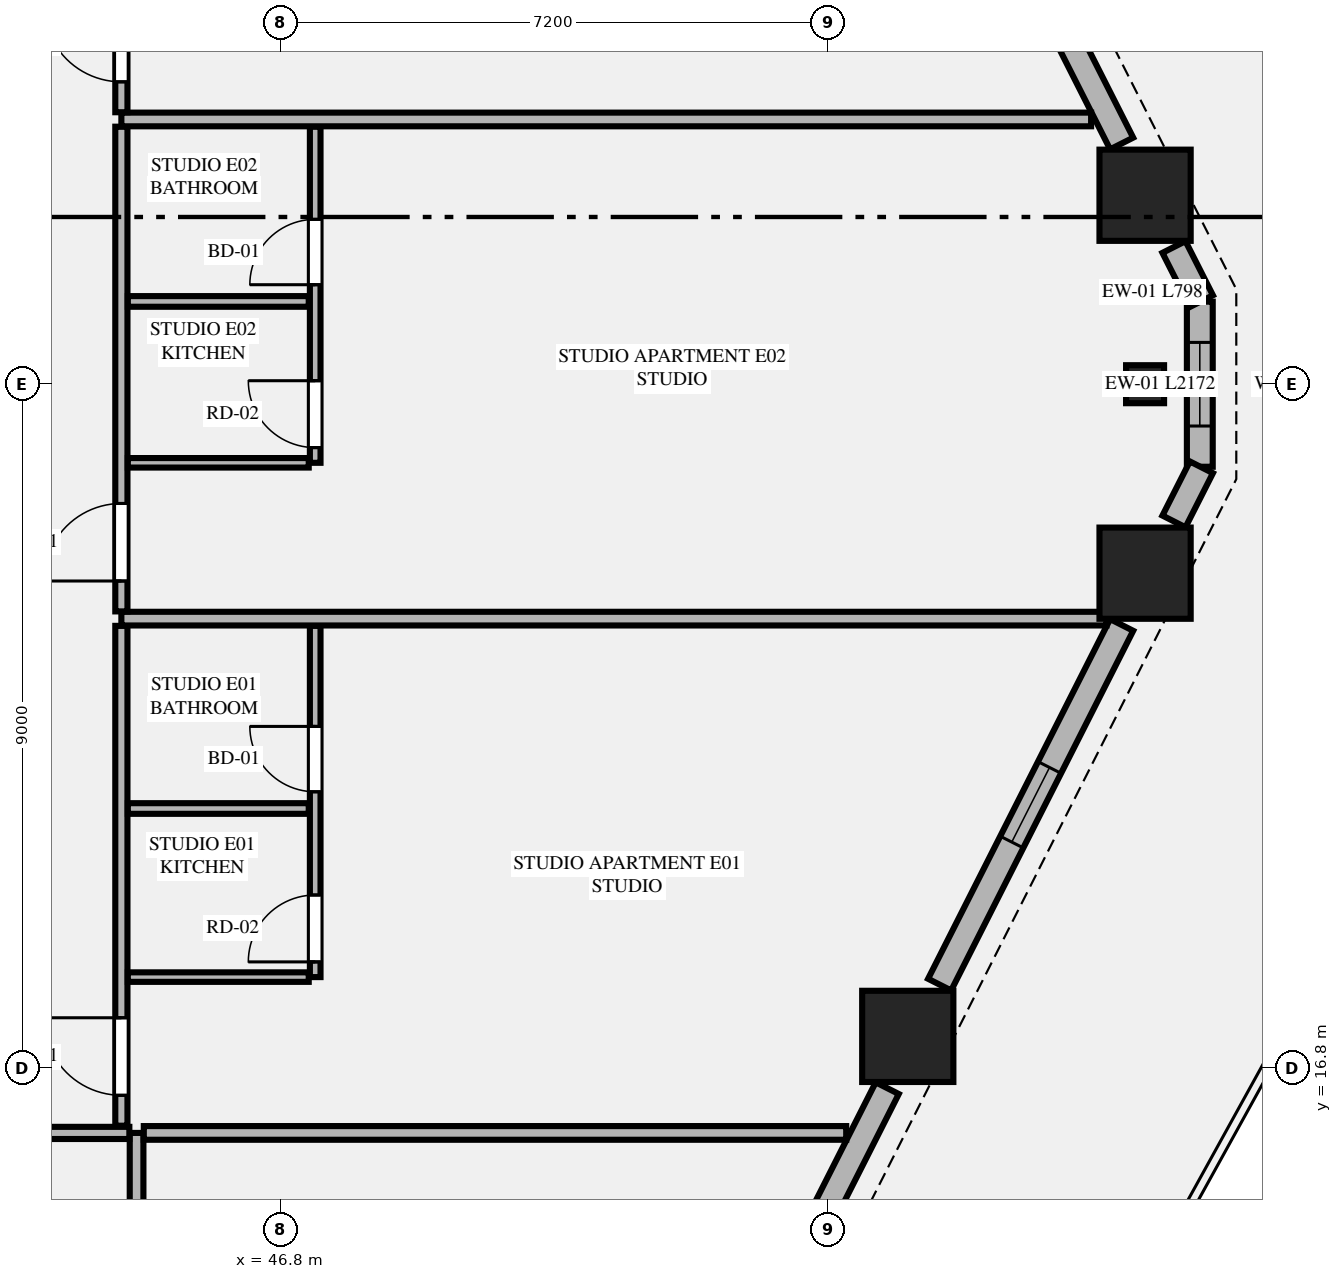
"""IFC4 building model, lengths in metres.
Left out: names, types, materials, properties, quantities, classifications, styles, units other than length and angle.
Written with IfcOpenShell. Run it as: python <this file> out.ifc"""

import sys

from ifc_helpers import new_model, si_unit, direction, frame, frame_2d, origin, origin_2d, place, context, subcontext, project, spatial, rectangle, extrude, element, fill, save


model = new_model("IFC4")
c1 = context("Model", 3, precision=1e-05, world=origin(), true_north=direction((0.0, 1.0)))
c2 = subcontext(c1, "Body", "Model", "MODEL_VIEW")
j1 = project(units=[si_unit("LENGTHUNIT", "METRE"), si_unit("PLANEANGLEUNIT", "RADIAN")], contexts=[c1])
p1 = place(None, origin())
s1 = spatial("IfcSite", under=j1, at=p1, CompositionType="ELEMENT")
p2 = place(p1, origin())
s2 = spatial("IfcBuilding", under=s1, at=p2, CompositionType="ELEMENT")
p3 = place(p2, frame((0.0, 0.0, 24.9)))
s3 = spatial("IfcBuildingStorey", under=s2, at=p3, CompositionType="ELEMENT", Elevation=24.9)
for number, where, z_axis, x_axis in (
    (1, (55.046, 17.22, 0.0), (0.0, 0.0, 1.0), (1.0, 0.0, 0.0)),
    (2, (58.168, 23.314, 0.0), (0.0, 0.0, 1.0), (1.0, 0.0, 0.0)),
    (3, (58.168, 28.286, 0.0), (0.0, 0.0, 1.0), (1.0, 0.0, 0.0)),
):
    element("IfcColumn", number, at=place(p3, frame(where, z_axis=z_axis, x_axis=x_axis)), inside=s3, PredefinedType="COLUMN", context=c2, shape_type="SweptSolid", body=[
        extrude(rectangle(XDim=1.2, YDim=1.2, at=origin_2d()), origin(), (0.0, 0.0, 1.0), 3.55),
    ])
p4 = place(p3, frame((58.168, 25.8, 0.0), z_axis=(0.0, 0.0, 1.0), x_axis=(0.0, 1.0, 0.0)))
e4 = element("IfcColumn", 4, at=p4, inside=s3, PredefinedType="PILASTER", context=c2, shape_type="SweptSolid", body=[
    extrude(rectangle(XDim=0.5, YDim=0.35, at=origin_2d()), origin(), (0.0, 0.0, 1.0), 3.55),
])
p5 = place(p3, frame((58.888, 24.714, 0.0), z_axis=(0.0, 0.0, 1.0), x_axis=(0.0, 1.0, 0.0)))
e5 = element("IfcWall", 5, at=p5, inside=s3, PredefinedType="STANDARD", context=c2, shape_type="SweptSolid", body=[
    extrude(rectangle(XDim=2.172, YDim=0.34, at=frame_2d((1.086, 0.0))), origin(), (0.0, 0.0, 1.0), 3.33),
])
p6 = place(p5, frame((0.536, 0.0, 0.75)))
e6 = element("IfcOpeningElement", 6, at=p6, cuts=e5, PredefinedType="OPENING", context=c2, shape_type="SweptSolid", body=[
    extrude(rectangle(XDim=1.1, YDim=2.0, at=frame_2d((0.55, 1.0))), frame((0.0, 0.18, 0.0), z_axis=(0.0, -1.0, 0.0), x_axis=(1.0, 0.0, 0.0)), (0.0, 0.0, 1.0), 0.36),
])
p7 = place(p3, frame((52.271, 11.59, 0.0), z_axis=(0.0, 0.0, 1.0), x_axis=(0.451592100298, 0.892224509273, 0.0)))
e7 = element("IfcWall", 7, at=p7, inside=s3, PredefinedType="STANDARD", context=c2, shape_type="SweptSolid", body=[
    extrude(rectangle(XDim=5.547, YDim=0.34, at=frame_2d((2.773, 0.0))), origin(), (0.0, 0.0, 1.0), 2.787),
])
p8 = place(p7, frame((2.223, 0.0, 0.75)))
e8 = element("IfcOpeningElement", 8, at=p8, cuts=e7, PredefinedType="OPENING", context=c2, shape_type="SweptSolid", body=[
    extrude(rectangle(XDim=1.1, YDim=1.887, at=frame_2d((0.55, 0.943))), frame((0.0, 0.18, 0.0), z_axis=(0.0, -1.0, 0.0), x_axis=(1.0, 0.0, 0.0)), (0.0, 0.0, 1.0), 0.36),
])
p9 = place(p3, frame((55.465, 17.901, 0.0), z_axis=(0.0, 0.0, 1.0), x_axis=(0.451572088722, 0.892234637686, 0.0)))
e9 = element("IfcWall", 9, at=p9, inside=s3, PredefinedType="STANDARD", context=c2, shape_type="SweptSolid", body=[
    extrude(rectangle(XDim=5.304, YDim=0.34, at=frame_2d((2.652, 0.0))), origin(), (0.0, 0.0, 1.0), 2.787),
])
p10 = place(p9, frame((2.102, 0.0, 0.75)))
e10 = element("IfcOpeningElement", 10, at=p10, cuts=e9, PredefinedType="OPENING", context=c2, shape_type="SweptSolid", body=[
    extrude(rectangle(XDim=1.1, YDim=1.887, at=frame_2d((0.55, 0.943))), frame((0.0, 0.18, 0.0), z_axis=(0.0, -1.0, 0.0), x_axis=(1.0, 0.0, 0.0)), (0.0, 0.0, 1.0), 0.36),
])
for number, where, z_axis, x_axis in (
    (11, (58.548, 23.995, 0.0), (0.0, 0.0, 1.0), (0.452, 0.892, 0.0)),
    (12, (58.909, 26.893, 0.0), (0.0, 0.0, 1.0), (-0.452, 0.892, 0.0)),
):
    element("IfcWall", number, at=place(p3, frame(where, z_axis=z_axis, x_axis=x_axis)), inside=s3, PredefinedType="STANDARD", context=c2, shape_type="SweptSolid", body=[
        extrude(rectangle(XDim=0.798, YDim=0.34, at=frame_2d((0.399, 0.0))), origin(), (0.0, 0.0, 1.0), 3.33),
    ])
p11 = place(p3, frame((57.86, 28.967, 0.0), z_axis=(0.0, 0.0, 1.0), x_axis=(-0.451590635984, 0.892225250422, 0.0)))
e13 = element("IfcWall", 13, at=p11, inside=s3, PredefinedType="STANDARD", context=c2, shape_type="SweptSolid", body=[
    extrude(rectangle(XDim=5.303, YDim=0.34, at=frame_2d((2.652, 0.0))), origin(), (0.0, 0.0, 1.0), 2.787),
])
p12 = place(p11, frame((2.102, 0.0, 0.75)))
e14 = element("IfcOpeningElement", 14, at=p12, cuts=e13, PredefinedType="OPENING", context=c2, shape_type="SweptSolid", body=[
    extrude(rectangle(XDim=1.1, YDim=1.887, at=frame_2d((0.55, 0.943))), frame((0.0, 0.18, 0.0), z_axis=(0.0, -1.0, 0.0), x_axis=(1.0, 0.0, 0.0)), (0.0, 0.0, 1.0), 0.36),
])
p13 = place(p3, frame((44.9, 2.455, 0.0), z_axis=(0.0, 0.0, 1.0), x_axis=(0.0, 1.0, 0.0)))
e15 = element("IfcWall", 15, at=p13, inside=s3, PredefinedType="PARTITIONING", context=c2, shape_type="SweptSolid", body=[
    extrude(rectangle(XDim=13.495, YDim=0.18, at=frame_2d((6.748, 0.0))), origin(), (0.0, 0.0, 1.0), 3.33),
])
p14 = place(p3, frame((36.617, 15.95, 0.0), z_axis=(0.0, 0.0, 1.0), x_axis=(1.0, 0.0, 0.0)))
e16 = element("IfcWall", 16, at=p14, inside=s3, PredefinedType="PARTITIONING", context=c2, shape_type="SweptSolid", body=[
    extrude(rectangle(XDim=8.188, YDim=0.16, at=frame_2d((4.094, 0.0))), origin(), (0.0, 0.0, 1.0), 3.33),
])
p15 = place(p14, frame((0.355, 0.0, 0.0)))
e17 = element("IfcOpeningElement", 17, at=p15, cuts=e16, PredefinedType="OPENING", context=c2, shape_type="SweptSolid", body=[
    extrude(rectangle(XDim=1.02, YDim=2.25, at=frame_2d((0.51, 1.125))), frame((0.0, 0.09, 0.0), z_axis=(0.0, -1.0, 0.0), x_axis=(1.0, 0.0, 0.0)), (0.0, 0.0, 1.0), 0.18),
])
p16 = place(p3, frame((44.995, 15.95, 0.0), z_axis=(0.0, 0.0, 1.0), x_axis=(1.0, 0.0, 0.0)))
e18 = element("IfcWall", 18, at=p16, inside=s3, PredefinedType="PARTITIONING", context=c2, shape_type="SweptSolid", body=[
    extrude(rectangle(XDim=9.241, YDim=0.18, at=frame_2d((4.621, 0.0))), origin(), (0.0, 0.0, 1.0), 3.33),
])
p17 = place(p3, frame((44.7, 16.045, 0.0), z_axis=(0.0, 0.0, 1.0), x_axis=(0.0, 1.0, 0.0)))
e19 = element("IfcWall", 19, at=p17, inside=s3, PredefinedType="PARTITIONING", context=c2, shape_type="SweptSolid", body=[
    extrude(rectangle(XDim=6.576, YDim=0.16, at=frame_2d((3.288, 0.0))), origin(), (0.0, 0.0, 1.0), 3.33),
])
p18 = place(p17, frame((0.4, 0.0, 0.0)))
e20 = element("IfcOpeningElement", 20, at=p18, cuts=e19, PredefinedType="OPENING", context=c2, shape_type="SweptSolid", body=[
    extrude(rectangle(XDim=1.02, YDim=2.25, at=frame_2d((0.51, 1.125))), frame((0.0, 0.09, 0.0), z_axis=(0.0, -1.0, 0.0), x_axis=(1.0, 0.0, 0.0)), (0.0, 0.0, 1.0), 0.18),
])
p19 = place(p3, frame((44.785, 18.0, 0.0), z_axis=(0.0, 0.0, 1.0), x_axis=(1.0, 0.0, 0.0)))
e21 = element("IfcWall", 21, at=p19, inside=s3, PredefinedType="PARTITIONING", context=c2, shape_type="SweptSolid", body=[
    extrude(rectangle(XDim=2.38, YDim=0.125, at=frame_2d((1.19, 0.0))), origin(), (0.0, 0.0, 1.0), 2.637),
])
p20 = place(p3, frame((47.25, 18.0, 0.0), z_axis=(0.0, 0.0, 1.0), x_axis=(0.0, 1.0, 0.0)))
e22 = element("IfcWall", 22, at=p20, inside=s3, PredefinedType="PLUMBINGWALL", context=c2, shape_type="SweptSolid", body=[
    extrude(rectangle(XDim=4.621, YDim=0.14, at=frame_2d((2.311, 0.0))), origin(), (0.0, 0.0, 1.0), 3.33),
])
p21 = place(p20, frame((2.438, 0.0, 0.0)))
e23 = element("IfcOpeningElement", 23, at=p21, cuts=e22, PredefinedType="OPENING", context=c2, shape_type="SweptSolid", body=[
    extrude(rectangle(XDim=0.86, YDim=2.1, at=frame_2d((0.43, 1.05))), frame((0.0, 0.08, 0.0), z_axis=(0.0, -1.0, 0.0), x_axis=(1.0, 0.0, 0.0)), (0.0, 0.0, 1.0), 0.16),
])
p22 = place(p20, frame((0.2, 0.0, 0.0)))
e24 = element("IfcOpeningElement", 24, at=p22, cuts=e22, PredefinedType="OPENING", context=c2, shape_type="SweptSolid", body=[
    extrude(rectangle(XDim=0.88, YDim=2.15, at=frame_2d((0.44, 1.075))), frame((0.0, 0.08, 0.0), z_axis=(0.0, -1.0, 0.0), x_axis=(1.0, 0.0, 0.0)), (0.0, 0.0, 1.0), 0.16),
])
p23 = place(p3, frame((44.785, 20.218, 0.0), z_axis=(0.0, 0.0, 1.0), x_axis=(1.0, 0.0, 0.0)))
e25 = element("IfcWall", 25, at=p23, inside=s3, PredefinedType="PLUMBINGWALL", context=c2, shape_type="SweptSolid", body=[
    extrude(rectangle(XDim=2.38, YDim=0.14, at=frame_2d((1.19, 0.0))), origin(), (0.0, 0.0, 1.0), 3.33),
])
p24 = place(p3, frame((44.7, 22.716, 0.0), z_axis=(0.0, 0.0, 1.0), x_axis=(1.0, 0.0, 0.0)))
e26 = element("IfcWall", 26, at=p24, inside=s3, PredefinedType="PARTITIONING", context=c2, shape_type="SweptSolid", body=[
    extrude(rectangle(XDim=12.96, YDim=0.18, at=frame_2d((6.48, 0.0))), origin(), (0.0, 0.0, 1.0), 3.33),
])
p25 = place(p3, frame((44.7, 22.811, 0.0), z_axis=(0.0, 0.0, 1.0), x_axis=(0.0, 1.0, 0.0)))
e27 = element("IfcWall", 27, at=p25, inside=s3, PredefinedType="PARTITIONING", context=c2, shape_type="SweptSolid", body=[
    extrude(rectangle(XDim=6.377, YDim=0.16, at=frame_2d((3.188, 0.0))), origin(), (0.0, 0.0, 1.0), 3.33),
])
p26 = place(p25, frame((0.4, 0.0, 0.0)))
e28 = element("IfcOpeningElement", 28, at=p26, cuts=e27, PredefinedType="OPENING", context=c2, shape_type="SweptSolid", body=[
    extrude(rectangle(XDim=1.02, YDim=2.25, at=frame_2d((0.51, 1.125))), frame((0.0, 0.09, 0.0), z_axis=(0.0, -1.0, 0.0), x_axis=(1.0, 0.0, 0.0)), (0.0, 0.0, 1.0), 0.18),
])
p27 = place(p3, frame((44.785, 24.766, 0.0), z_axis=(0.0, 0.0, 1.0), x_axis=(1.0, 0.0, 0.0)))
e29 = element("IfcWall", 29, at=p27, inside=s3, PredefinedType="PARTITIONING", context=c2, shape_type="SweptSolid", body=[
    extrude(rectangle(XDim=2.38, YDim=0.125, at=frame_2d((1.19, 0.0))), origin(), (0.0, 0.0, 1.0), 3.33),
])
p28 = place(p3, frame((47.25, 24.766, 0.0), z_axis=(0.0, 0.0, 1.0), x_axis=(0.0, 1.0, 0.0)))
e30 = element("IfcWall", 30, at=p28, inside=s3, PredefinedType="PLUMBINGWALL", context=c2, shape_type="SweptSolid", body=[
    extrude(rectangle(XDim=4.422, YDim=0.14, at=frame_2d((2.211, 0.0))), origin(), (0.0, 0.0, 1.0), 3.33),
])
p29 = place(p28, frame((2.343, 0.0, 0.0)))
e31 = element("IfcOpeningElement", 31, at=p29, cuts=e30, PredefinedType="OPENING", context=c2, shape_type="SweptSolid", body=[
    extrude(rectangle(XDim=0.86, YDim=2.1, at=frame_2d((0.43, 1.05))), frame((0.0, 0.08, 0.0), z_axis=(0.0, -1.0, 0.0), x_axis=(1.0, 0.0, 0.0)), (0.0, 0.0, 1.0), 0.16),
])
p30 = place(p28, frame((0.2, 0.0, 0.0)))
e32 = element("IfcOpeningElement", 32, at=p30, cuts=e30, PredefinedType="OPENING", context=c2, shape_type="SweptSolid", body=[
    extrude(rectangle(XDim=0.88, YDim=2.15, at=frame_2d((0.44, 1.075))), frame((0.0, 0.08, 0.0), z_axis=(0.0, -1.0, 0.0), x_axis=(1.0, 0.0, 0.0)), (0.0, 0.0, 1.0), 0.16),
])
p31 = place(p3, frame((44.785, 26.889, 0.0), z_axis=(0.0, 0.0, 1.0), x_axis=(1.0, 0.0, 0.0)))
e33 = element("IfcWall", 33, at=p31, inside=s3, PredefinedType="PLUMBINGWALL", context=c2, shape_type="SweptSolid", body=[
    extrude(rectangle(XDim=2.38, YDim=0.14, at=frame_2d((1.19, 0.0))), origin(), (0.0, 0.0, 1.0), 3.33),
])
p32 = place(p3, frame((44.7, 29.283, 0.0), z_axis=(0.0, 0.0, 1.0), x_axis=(1.0, 0.0, 0.0)))
e34 = element("IfcWall", 34, at=p32, inside=s3, PredefinedType="PARTITIONING", context=c2, shape_type="SweptSolid", body=[
    extrude(rectangle(XDim=12.758, YDim=0.18, at=frame_2d((6.379, 0.0))), origin(), (0.0, 0.0, 1.0), 3.33),
])
p33 = place(p3, frame((44.7, 29.378, 0.0), z_axis=(0.0, 0.0, 1.0), x_axis=(0.0, 1.0, 0.0)))
e35 = element("IfcWall", 35, at=p33, inside=s3, PredefinedType="PARTITIONING", context=c2, shape_type="SweptSolid", body=[
    extrude(rectangle(XDim=6.377, YDim=0.16, at=frame_2d((3.188, 0.0))), origin(), (0.0, 0.0, 1.0), 3.33),
])
p34 = place(p33, frame((0.4, 0.0, 0.0)))
e36 = element("IfcOpeningElement", 36, at=p34, cuts=e35, PredefinedType="OPENING", context=c2, shape_type="SweptSolid", body=[
    extrude(rectangle(XDim=1.02, YDim=2.25, at=frame_2d((0.51, 1.125))), frame((0.0, 0.09, 0.0), z_axis=(0.0, -1.0, 0.0), x_axis=(1.0, 0.0, 0.0)), (0.0, 0.0, 1.0), 0.18),
])
p35 = place(p10, origin())
e37 = element("IfcWindow", 37, at=p35, inside=s3, PartitioningType="SINGLE_PANEL", PredefinedType="WINDOW", context=c2, shape_type="SweptSolid", body=[
    extrude(rectangle(XDim=1.1, YDim=1.887, at=frame_2d((0.55, 0.943))), frame((0.0, 0.03, 0.0), z_axis=(0.0, -1.0, 0.0), x_axis=(1.0, 0.0, 0.0)), (0.0, 0.0, 1.0), 0.06),
])
fill(e10, e37)
p36 = place(p21, origin())
e38 = element("IfcDoor", 38, at=p36, inside=s3, OperationType="SINGLE_SWING_RIGHT", PredefinedType="DOOR", context=c2, shape_type="SweptSolid", body=[
    extrude(rectangle(XDim=0.86, YDim=2.1, at=frame_2d((0.43, 1.05))), frame((0.0, 0.025, 0.0), z_axis=(0.0, -1.0, 0.0), x_axis=(1.0, 0.0, 0.0)), (0.0, 0.0, 1.0), 0.05),
])
fill(e23, e38)
p37 = place(p18, origin())
e39 = element("IfcDoor", 39, at=p37, inside=s3, OperationType="SINGLE_SWING_RIGHT", PredefinedType="DOOR", context=c2, shape_type="SweptSolid", body=[
    extrude(rectangle(XDim=1.02, YDim=2.25, at=frame_2d((0.51, 1.125))), frame((0.0, 0.025, 0.0), z_axis=(0.0, -1.0, 0.0), x_axis=(1.0, 0.0, 0.0)), (0.0, 0.0, 1.0), 0.05),
])
fill(e20, e39)
p38 = place(p22, origin())
e40 = element("IfcDoor", 40, at=p38, inside=s3, OperationType="SINGLE_SWING_LEFT", PredefinedType="DOOR", context=c2, shape_type="SweptSolid", body=[
    extrude(rectangle(XDim=0.88, YDim=2.15, at=frame_2d((0.44, 1.075))), frame((0.0, 0.025, 0.0), z_axis=(0.0, -1.0, 0.0), x_axis=(1.0, 0.0, 0.0)), (0.0, 0.0, 1.0), 0.05),
])
fill(e24, e40)
p39 = place(p29, origin())
e41 = element("IfcDoor", 41, at=p39, inside=s3, OperationType="SINGLE_SWING_LEFT", PredefinedType="DOOR", context=c2, shape_type="SweptSolid", body=[
    extrude(rectangle(XDim=0.86, YDim=2.1, at=frame_2d((0.43, 1.05))), frame((0.0, 0.025, 0.0), z_axis=(0.0, -1.0, 0.0), x_axis=(1.0, 0.0, 0.0)), (0.0, 0.0, 1.0), 0.05),
])
fill(e31, e41)
p40 = place(p26, origin())
e42 = element("IfcDoor", 42, at=p40, inside=s3, OperationType="SINGLE_SWING_LEFT", PredefinedType="DOOR", context=c2, shape_type="SweptSolid", body=[
    extrude(rectangle(XDim=1.02, YDim=2.25, at=frame_2d((0.51, 1.125))), frame((0.0, 0.025, 0.0), z_axis=(0.0, -1.0, 0.0), x_axis=(1.0, 0.0, 0.0)), (0.0, 0.0, 1.0), 0.05),
])
fill(e28, e42)
p41 = place(p30, origin())
e43 = element("IfcDoor", 43, at=p41, inside=s3, OperationType="SINGLE_SWING_RIGHT", PredefinedType="DOOR", context=c2, shape_type="SweptSolid", body=[
    extrude(rectangle(XDim=0.88, YDim=2.15, at=frame_2d((0.44, 1.075))), frame((0.0, 0.025, 0.0), z_axis=(0.0, -1.0, 0.0), x_axis=(1.0, 0.0, 0.0)), (0.0, 0.0, 1.0), 0.05),
])
fill(e32, e43)
p42 = place(p34, origin())
e44 = element("IfcDoor", 44, at=p42, inside=s3, OperationType="SINGLE_SWING_RIGHT", PredefinedType="DOOR", context=c2, shape_type="SweptSolid", body=[
    extrude(rectangle(XDim=1.02, YDim=2.25, at=frame_2d((0.51, 1.125))), frame((0.0, 0.025, 0.0), z_axis=(0.0, -1.0, 0.0), x_axis=(1.0, 0.0, 0.0)), (0.0, 0.0, 1.0), 0.05),
])
fill(e36, e44)
p43 = place(p6, origin())
e45 = element("IfcWindow", 45, at=p43, inside=s3, PartitioningType="SINGLE_PANEL", PredefinedType="WINDOW", context=c2, shape_type="SweptSolid", body=[
    extrude(rectangle(XDim=1.1, YDim=2.0, at=frame_2d((0.55, 1.0))), frame((0.0, 0.03, 0.0), z_axis=(0.0, -1.0, 0.0), x_axis=(1.0, 0.0, 0.0)), (0.0, 0.0, 1.0), 0.06),
])
fill(e6, e45)
save(model, sys.argv[1])
